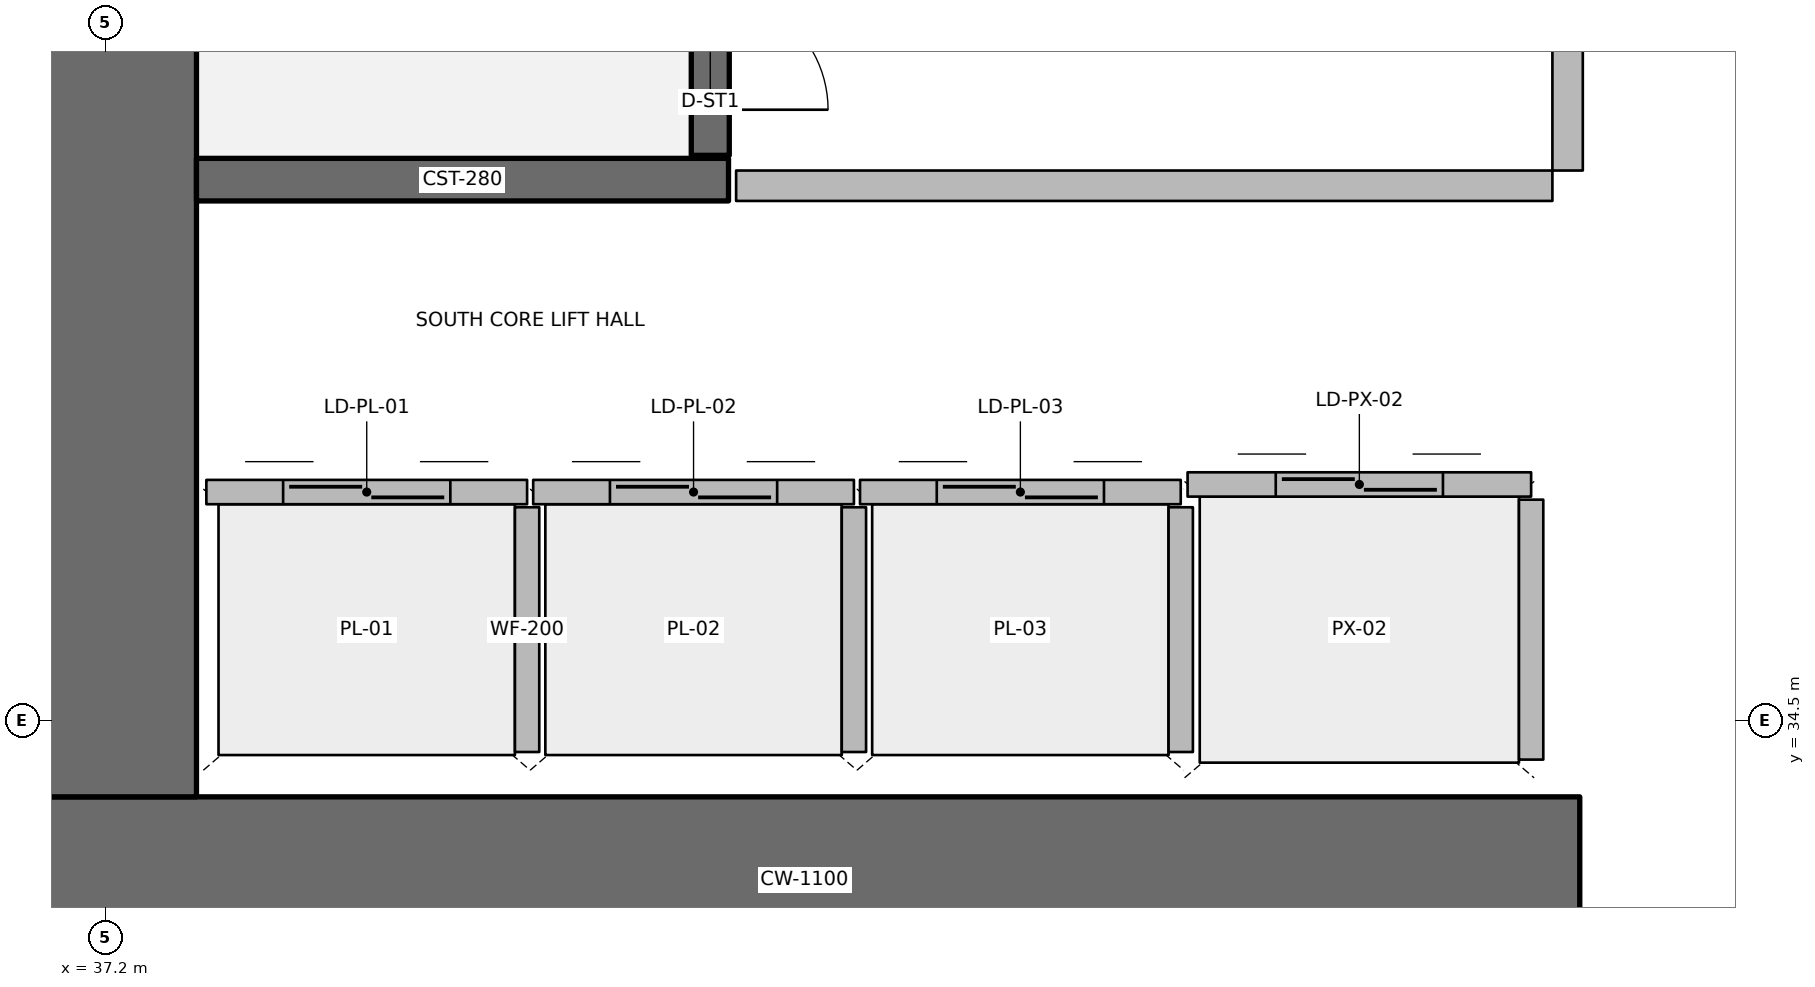
"""IFC4 building model, lengths in metres.
Left out: names, types, materials, properties, quantities, classifications, styles, units other than length and angle.
Written with IfcOpenShell. Run it as: python <this file> out.ifc"""

import sys

from ifc_helpers import new_model, si_unit, direction, frame, frame_2d, origin, place, context, subcontext, project, spatial, rectangle, extrude, element, fill, save


model = new_model("IFC4")
c1 = context("Model", 3, precision=1e-05, world=origin(), true_north=direction((0.0, 1.0)))
c2 = subcontext(c1, "Body", "Model", "MODEL_VIEW")
j1 = project(units=[si_unit("LENGTHUNIT", "METRE"), si_unit("PLANEANGLEUNIT", "RADIAN")], contexts=[c1])
p1 = place(None, origin())
s1 = spatial("IfcSite", under=j1, at=p1, CompositionType="ELEMENT")
p2 = place(p1, origin())
s2 = spatial("IfcBuilding", under=s1, at=p2, CompositionType="ELEMENT")
p3 = place(p2, origin())
s3 = spatial("IfcBuildingStorey", under=s2, at=p3, CompositionType="ELEMENT", Elevation=0.0)
p4 = place(p3, frame((36.7, 33.45, 0.0), z_axis=(0.0, 0.0, 1.0), x_axis=(1.0, 0.0, 0.0)))
e1 = element("IfcWall", 1, at=p4, inside=s3, PredefinedType="SHEAR", context=c2, shape_type="SweptSolid", body=[
    extrude(rectangle(XDim=10.2, YDim=1.1, at=frame_2d((5.1, 0.0))), origin(), (0.0, 0.0, 1.0), 7.2),
])
p5 = place(p3, frame((37.25, 34.0, 0.0), z_axis=(0.0, 0.0, 1.0), x_axis=(0.0, 1.0, 0.0)))
e2 = element("IfcWall", 2, at=p5, inside=s3, PredefinedType="SHEAR", context=c2, shape_type="SweptSolid", body=[
    extrude(rectangle(XDim=16.0, YDim=1.1, at=frame_2d((8.0, 0.0))), origin(), (0.0, 0.0, 1.0), 7.2),
])
p6 = place(p3, frame((37.8, 38.06, 0.0), z_axis=(0.0, 0.0, 1.0), x_axis=(1.0, 0.0, 0.0)))
e3 = element("IfcWall", 3, at=p6, inside=s3, PredefinedType="SHEAR", context=c2, shape_type="SweptSolid", body=[
    extrude(rectangle(XDim=3.5, YDim=0.28, at=frame_2d((1.75, 0.0))), origin(), (0.0, 0.0, 1.0), 7.2),
])
p7 = place(p3, frame((41.18, 38.22, 0.0), z_axis=(0.0, 0.0, 1.0), x_axis=(0.0, 1.0, 0.0)))
e4 = element("IfcWall", 4, at=p7, inside=s3, PredefinedType="SOLIDWALL", context=c2, shape_type="SweptSolid", body=[
    extrude(rectangle(XDim=7.56, YDim=0.25, at=frame_2d((3.78, 0.0))), origin(), (0.0, 0.0, 1.0), 6.8),
])
p8 = place(p7, frame((0.3, 0.0, 0.0)))
e5 = element("IfcOpeningElement", 5, at=p8, cuts=e4, PredefinedType="OPENING", context=c2, shape_type="SweptSolid", body=[
    extrude(rectangle(XDim=1.55, YDim=2.15, at=frame_2d((0.775, 1.075))), frame((0.0, 0.135, 0.0), z_axis=(0.0, -1.0, 0.0), x_axis=(1.0, 0.0, 0.0)), (0.0, 0.0, 1.0), 0.27),
])
p9 = place(p3, frame((37.865, 36.005, 0.0), z_axis=(0.0, 0.0, 1.0), x_axis=(1.0, 0.0, 0.0)))
e6 = element("IfcWall", 6, at=p9, inside=s3, PredefinedType="PARTITIONING", context=c2, shape_type="SweptSolid", body=[
    extrude(rectangle(XDim=2.11, YDim=0.16, at=frame_2d((1.055, 0.0))), origin(), (0.0, 0.0, 1.0), 6.8),
])
p10 = place(p9, frame((0.505, 0.0, 0.0)))
e7 = element("IfcOpeningElement", 7, at=p10, cuts=e6, PredefinedType="OPENING", context=c2, shape_type="SweptSolid", body=[
    extrude(rectangle(XDim=1.1, YDim=2.1, at=frame_2d((0.55, 1.05))), frame((0.0, 0.09, 0.0), z_axis=(0.0, -1.0, 0.0), x_axis=(1.0, 0.0, 0.0)), (0.0, 0.0, 1.0), 0.18),
])
p11 = place(p3, frame((39.975, 34.295, 0.0), z_axis=(0.0, 0.0, 1.0), x_axis=(0.0, 1.0, 0.0)))
e8 = element("IfcWall", 8, at=p11, inside=s3, PredefinedType="PARTITIONING", context=c2, shape_type="SweptSolid", body=[
    extrude(rectangle(XDim=1.61, YDim=0.16, at=frame_2d((0.805, 0.0))), origin(), (0.0, 0.0, 1.0), 6.8),
])
p12 = place(p3, frame((40.015, 36.005, 0.0), z_axis=(0.0, 0.0, 1.0), x_axis=(1.0, 0.0, 0.0)))
e9 = element("IfcWall", 9, at=p12, inside=s3, PredefinedType="PARTITIONING", context=c2, shape_type="SweptSolid", body=[
    extrude(rectangle(XDim=2.11, YDim=0.16, at=frame_2d((1.055, 0.0))), origin(), (0.0, 0.0, 1.0), 6.8),
])
p13 = place(p12, frame((0.505, 0.0, 0.0)))
e10 = element("IfcOpeningElement", 10, at=p13, cuts=e9, PredefinedType="OPENING", context=c2, shape_type="SweptSolid", body=[
    extrude(rectangle(XDim=1.1, YDim=2.1, at=frame_2d((0.55, 1.05))), frame((0.0, 0.09, 0.0), z_axis=(0.0, -1.0, 0.0), x_axis=(1.0, 0.0, 0.0)), (0.0, 0.0, 1.0), 0.18),
])
p14 = place(p3, frame((42.125, 34.295, 0.0), z_axis=(0.0, 0.0, 1.0), x_axis=(0.0, 1.0, 0.0)))
e11 = element("IfcWall", 11, at=p14, inside=s3, PredefinedType="PARTITIONING", context=c2, shape_type="SweptSolid", body=[
    extrude(rectangle(XDim=1.61, YDim=0.16, at=frame_2d((0.805, 0.0))), origin(), (0.0, 0.0, 1.0), 6.8),
])
p15 = place(p3, frame((42.165, 36.005, 0.0), z_axis=(0.0, 0.0, 1.0), x_axis=(1.0, 0.0, 0.0)))
e12 = element("IfcWall", 12, at=p15, inside=s3, PredefinedType="PARTITIONING", context=c2, shape_type="SweptSolid", body=[
    extrude(rectangle(XDim=2.11, YDim=0.16, at=frame_2d((1.055, 0.0))), origin(), (0.0, 0.0, 1.0), 6.8),
])
p16 = place(p15, frame((0.505, 0.0, 0.0)))
e13 = element("IfcOpeningElement", 13, at=p16, cuts=e12, PredefinedType="OPENING", context=c2, shape_type="SweptSolid", body=[
    extrude(rectangle(XDim=1.1, YDim=2.1, at=frame_2d((0.55, 1.05))), frame((0.0, 0.09, 0.0), z_axis=(0.0, -1.0, 0.0), x_axis=(1.0, 0.0, 0.0)), (0.0, 0.0, 1.0), 0.18),
])
p17 = place(p3, frame((44.275, 34.295, 0.0), z_axis=(0.0, 0.0, 1.0), x_axis=(0.0, 1.0, 0.0)))
e14 = element("IfcWall", 14, at=p17, inside=s3, PredefinedType="PARTITIONING", context=c2, shape_type="SweptSolid", body=[
    extrude(rectangle(XDim=1.61, YDim=0.16, at=frame_2d((0.805, 0.0))), origin(), (0.0, 0.0, 1.0), 6.8),
])
p18 = place(p3, frame((44.32, 36.055, 0.0), z_axis=(0.0, 0.0, 1.0), x_axis=(1.0, 0.0, 0.0)))
e15 = element("IfcWall", 15, at=p18, inside=s3, PredefinedType="PARTITIONING", context=c2, shape_type="SweptSolid", body=[
    extrude(rectangle(XDim=2.26, YDim=0.16, at=frame_2d((1.13, 0.0))), origin(), (0.0, 0.0, 1.0), 6.8),
])
p19 = place(p18, frame((0.58, 0.0, 0.0)))
e16 = element("IfcOpeningElement", 16, at=p19, cuts=e15, PredefinedType="OPENING", context=c2, shape_type="SweptSolid", body=[
    extrude(rectangle(XDim=1.1, YDim=2.1, at=frame_2d((0.55, 1.05))), frame((0.0, 0.09, 0.0), z_axis=(0.0, -1.0, 0.0), x_axis=(1.0, 0.0, 0.0)), (0.0, 0.0, 1.0), 0.18),
])
p20 = place(p3, frame((46.58, 34.245, 0.0), z_axis=(0.0, 0.0, 1.0), x_axis=(0.0, 1.0, 0.0)))
e17 = element("IfcWall", 17, at=p20, inside=s3, PredefinedType="PARTITIONING", context=c2, shape_type="SweptSolid", body=[
    extrude(rectangle(XDim=1.71, YDim=0.16, at=frame_2d((0.855, 0.0))), origin(), (0.0, 0.0, 1.0), 6.8),
])
p21 = place(p3, frame((41.35, 38.02, 0.0), z_axis=(0.0, 0.0, 1.0), x_axis=(1.0, 0.0, 0.0)))
e18 = element("IfcWall", 18, at=p21, inside=s3, PredefinedType="PARTITIONING", context=c2, shape_type="SweptSolid", body=[
    extrude(rectangle(XDim=5.37, YDim=0.2, at=frame_2d((2.685, 0.0))), origin(), (0.0, 0.0, 1.0), 6.8),
])
p22 = place(p3, frame((46.82, 38.12, 0.0), z_axis=(0.0, 0.0, 1.0), x_axis=(0.0, 1.0, 0.0)))
e19 = element("IfcWall", 19, at=p22, inside=s3, PredefinedType="PARTITIONING", context=c2, shape_type="SweptSolid", body=[
    extrude(rectangle(XDim=3.26, YDim=0.2, at=frame_2d((1.63, 0.0))), origin(), (0.0, 0.0, 1.0), 6.8),
])
p23 = place(p22, frame((1.105, 0.0, 0.0)))
e20 = element("IfcOpeningElement", 20, at=p23, cuts=e19, PredefinedType="OPENING", context=c2, shape_type="SweptSolid", body=[
    extrude(rectangle(XDim=1.05, YDim=2.1, at=frame_2d((0.525, 1.05))), frame((0.0, 0.11, 0.0), z_axis=(0.0, -1.0, 0.0), x_axis=(1.0, 0.0, 0.0)), (0.0, 0.0, 1.0), 0.22),
])
p24 = place(p8, origin())
e21 = element("IfcDoor", 21, at=p24, inside=s3, OperationType="DOUBLE_DOOR_SINGLE_SWING", PredefinedType="DOOR", context=c2, shape_type="SweptSolid", body=[
    extrude(rectangle(XDim=1.55, YDim=2.15, at=frame_2d((0.775, 1.075))), frame((0.0, 0.025, 0.0), z_axis=(0.0, -1.0, 0.0), x_axis=(1.0, 0.0, 0.0)), (0.0, 0.0, 1.0), 0.05),
])
fill(e5, e21)
p25 = place(p10, origin())
e22 = element("IfcDoor", 22, at=p25, inside=s3, OperationType="DOUBLE_DOOR_SLIDING", PredefinedType="DOOR", context=c2, shape_type="SweptSolid", body=[
    extrude(rectangle(XDim=1.1, YDim=2.1, at=frame_2d((0.55, 1.05))), frame((0.0, 0.025, 0.0), z_axis=(0.0, -1.0, 0.0), x_axis=(1.0, 0.0, 0.0)), (0.0, 0.0, 1.0), 0.05),
])
fill(e7, e22)
p26 = place(p13, origin())
e23 = element("IfcDoor", 23, at=p26, inside=s3, OperationType="DOUBLE_DOOR_SLIDING", PredefinedType="DOOR", context=c2, shape_type="SweptSolid", body=[
    extrude(rectangle(XDim=1.1, YDim=2.1, at=frame_2d((0.55, 1.05))), frame((0.0, 0.025, 0.0), z_axis=(0.0, -1.0, 0.0), x_axis=(1.0, 0.0, 0.0)), (0.0, 0.0, 1.0), 0.05),
])
fill(e10, e23)
p27 = place(p16, origin())
e24 = element("IfcDoor", 24, at=p27, inside=s3, OperationType="DOUBLE_DOOR_SLIDING", PredefinedType="DOOR", context=c2, shape_type="SweptSolid", body=[
    extrude(rectangle(XDim=1.1, YDim=2.1, at=frame_2d((0.55, 1.05))), frame((0.0, 0.025, 0.0), z_axis=(0.0, -1.0, 0.0), x_axis=(1.0, 0.0, 0.0)), (0.0, 0.0, 1.0), 0.05),
])
fill(e13, e24)
p28 = place(p19, origin())
e25 = element("IfcDoor", 25, at=p28, inside=s3, OperationType="DOUBLE_DOOR_SLIDING", PredefinedType="DOOR", context=c2, shape_type="SweptSolid", body=[
    extrude(rectangle(XDim=1.1, YDim=2.1, at=frame_2d((0.55, 1.05))), frame((0.0, 0.025, 0.0), z_axis=(0.0, -1.0, 0.0), x_axis=(1.0, 0.0, 0.0)), (0.0, 0.0, 1.0), 0.05),
])
fill(e16, e25)
save(model, sys.argv[1])
